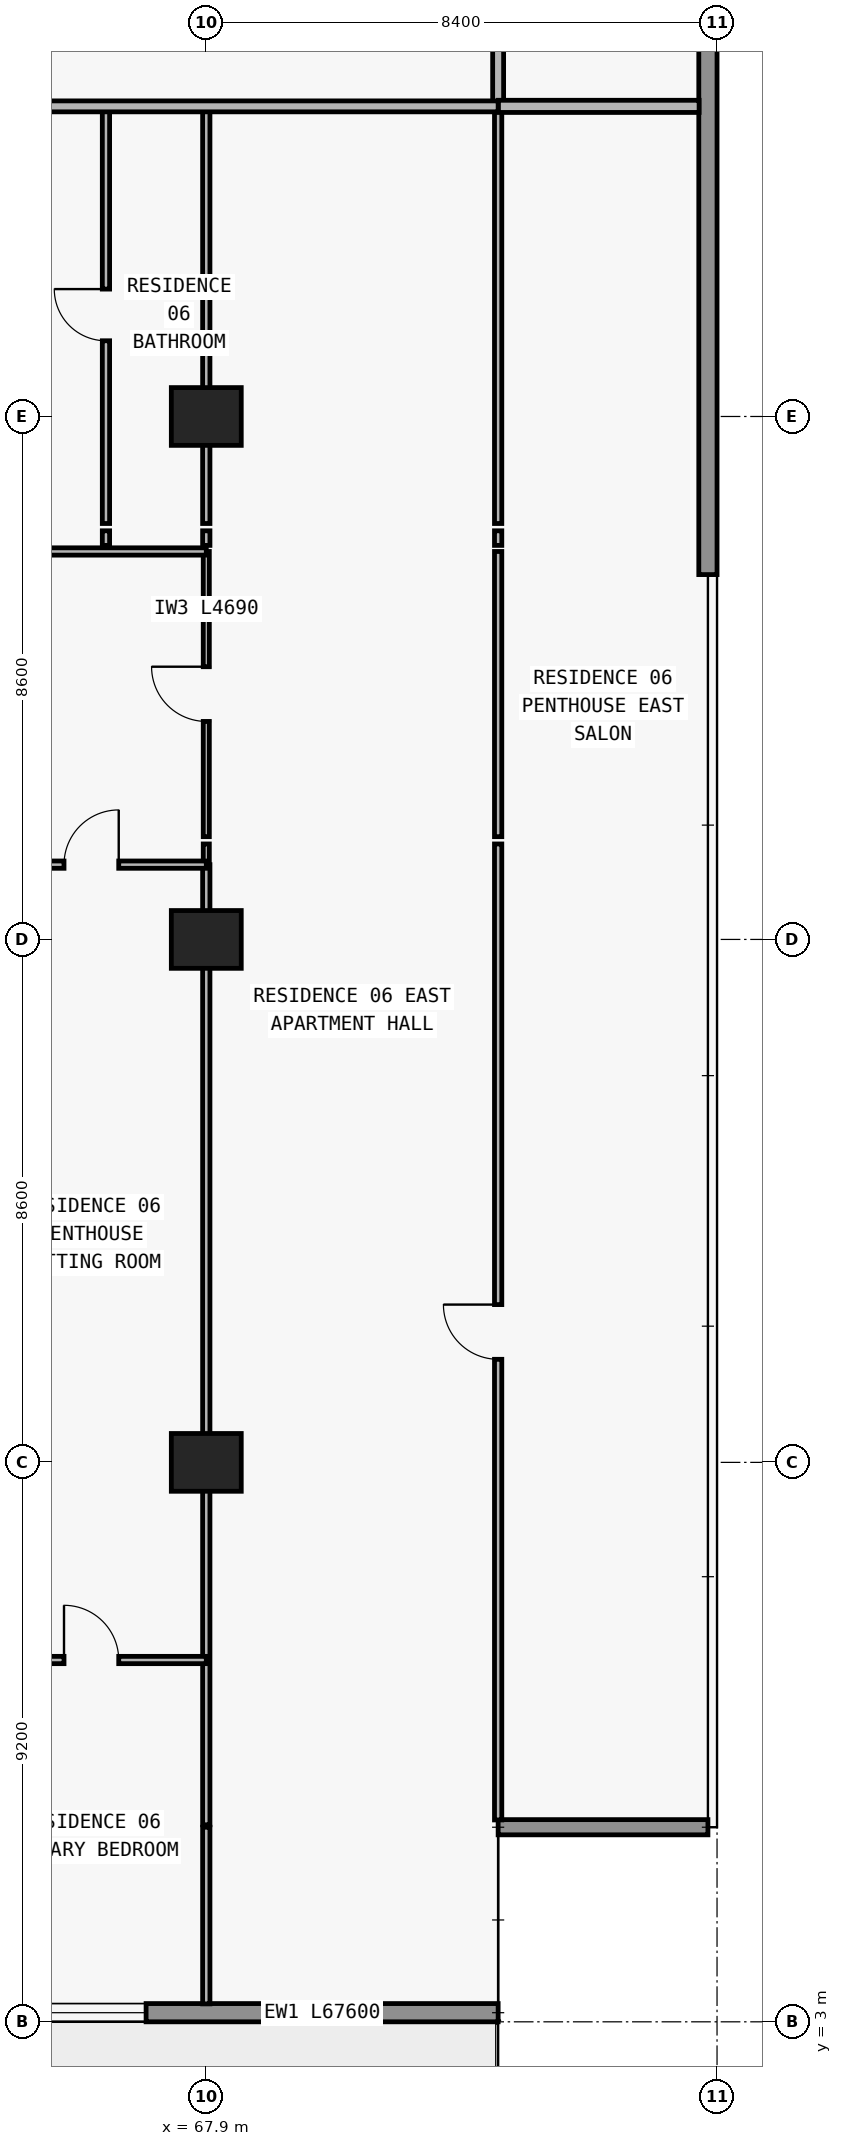
"""IFC4 building model, lengths in metres.
Left out: names, types, materials, properties, quantities, classifications, styles, units other than length and angle.
Written with IfcOpenShell. Run it as: python <this file> out.ifc"""

import sys

from ifc_helpers import new_model, si_unit, direction, frame, frame_2d, origin, origin_2d, place, context, subcontext, project, spatial, rectangle, extrude, element, fill, save


model = new_model("IFC4")
c1 = context("Model", 3, precision=1e-05, world=origin(), true_north=direction((0.0, 1.0)))
c2 = subcontext(c1, "Body", "Model", "MODEL_VIEW")
j1 = project(units=[si_unit("LENGTHUNIT", "METRE"), si_unit("PLANEANGLEUNIT", "RADIAN")], contexts=[c1])
p1 = place(None, origin())
s1 = spatial("IfcSite", under=j1, at=p1, CompositionType="ELEMENT")
p2 = place(p1, origin())
s2 = spatial("IfcBuilding", under=s1, at=p2, CompositionType="ELEMENT")
p3 = place(p2, frame((0.0, 0.0, 36.6)))
s3 = spatial("IfcBuildingStorey", under=s2, at=p3, CompositionType="ELEMENT", Elevation=36.6)
for number, where, z_axis, x_axis in (
    (1, (67.9, 12.2, 0.0), (0.0, 0.0, 1.0), (1.0, 0.0, 0.0)),
    (2, (67.9, 20.8, 0.0), (0.0, 0.0, 1.0), (1.0, 0.0, 0.0)),
    (3, (67.9, 29.4, 0.0), (0.0, 0.0, 1.0), (1.0, 0.0, 0.0)),
):
    element("IfcColumn", number, at=place(p3, frame(where, z_axis=z_axis, x_axis=x_axis)), inside=s3, PredefinedType="COLUMN", context=c2, shape_type="SweptSolid", body=[
        extrude(rectangle(XDim=1.15, YDim=0.95, at=origin_2d()), origin(), (0.0, 0.0, 1.0), 3.05),
    ])
p4 = place(p3, frame((72.7, 3.15, 0.0), z_axis=(0.0, 0.0, 1.0), x_axis=(-1.0, 0.0, 0.0)))
e4 = element("IfcWall", 4, at=p4, inside=s3, PredefinedType="STANDARD", context=c2, shape_type="SweptSolid", body=[
    extrude(rectangle(XDim=67.6, YDim=0.3, at=frame_2d((33.8, 0.0))), origin(), (0.0, 0.0, 1.0), 3.05),
])
p5 = place(p4, frame((59.826, 0.0, 0.0)))
e5 = element("IfcOpeningElement", 5, at=p5, cuts=e4, PredefinedType="OPENING", context=c2, shape_type="SweptSolid", body=[
    extrude(rectangle(XDim=2.0, YDim=2.3, at=frame_2d((1.0, 1.15))), frame((0.0, 0.16, 0.0), z_axis=(0.0, -1.0, 0.0), x_axis=(1.0, 0.0, 0.0)), (0.0, 0.0, 1.0), 0.32),
])
p6 = place(p4, frame((55.526, 0.0, 0.85)))
e6 = element("IfcOpeningElement", 6, at=p6, cuts=e4, PredefinedType="OPENING", context=c2, shape_type="SweptSolid", body=[
    extrude(rectangle(XDim=2.2, YDim=1.55, at=frame_2d((1.1, 0.775))), frame((0.0, 0.16, 0.0), z_axis=(0.0, -1.0, 0.0), x_axis=(1.0, 0.0, 0.0)), (0.0, 0.0, 1.0), 0.32),
])
p7 = place(p4, frame((51.09, 0.0, 0.0)))
e7 = element("IfcOpeningElement", 7, at=p7, cuts=e4, PredefinedType="OPENING", context=c2, shape_type="SweptSolid", body=[
    extrude(rectangle(XDim=2.0, YDim=2.3, at=frame_2d((1.0, 1.15))), frame((0.0, 0.16, 0.0), z_axis=(0.0, -1.0, 0.0), x_axis=(1.0, 0.0, 0.0)), (0.0, 0.0, 1.0), 0.32),
])
p8 = place(p4, frame((46.99, 0.0, 0.85)))
e8 = element("IfcOpeningElement", 8, at=p8, cuts=e4, PredefinedType="OPENING", context=c2, shape_type="SweptSolid", body=[
    extrude(rectangle(XDim=1.8, YDim=1.55, at=frame_2d((0.9, 0.775))), frame((0.0, 0.16, 0.0), z_axis=(0.0, -1.0, 0.0), x_axis=(1.0, 0.0, 0.0)), (0.0, 0.0, 1.0), 0.32),
])
p9 = place(p4, frame((43.026, 0.0, 0.0)))
e9 = element("IfcOpeningElement", 9, at=p9, cuts=e4, PredefinedType="OPENING", context=c2, shape_type="SweptSolid", body=[
    extrude(rectangle(XDim=2.0, YDim=2.3, at=frame_2d((1.0, 1.15))), frame((0.0, 0.16, 0.0), z_axis=(0.0, -1.0, 0.0), x_axis=(1.0, 0.0, 0.0)), (0.0, 0.0, 1.0), 0.32),
])
p10 = place(p4, frame((38.726, 0.0, 0.85)))
e10 = element("IfcOpeningElement", 10, at=p10, cuts=e4, PredefinedType="OPENING", context=c2, shape_type="SweptSolid", body=[
    extrude(rectangle(XDim=2.2, YDim=1.55, at=frame_2d((1.1, 0.775))), frame((0.0, 0.16, 0.0), z_axis=(0.0, -1.0, 0.0), x_axis=(1.0, 0.0, 0.0)), (0.0, 0.0, 1.0), 0.32),
])
p11 = place(p4, frame((34.69, 0.0, 0.0)))
e11 = element("IfcOpeningElement", 11, at=p11, cuts=e4, PredefinedType="OPENING", context=c2, shape_type="SweptSolid", body=[
    extrude(rectangle(XDim=2.0, YDim=2.3, at=frame_2d((1.0, 1.15))), frame((0.0, 0.16, 0.0), z_axis=(0.0, -1.0, 0.0), x_axis=(1.0, 0.0, 0.0)), (0.0, 0.0, 1.0), 0.32),
])
p12 = place(p4, frame((30.81, 0.0, 0.65)))
e12 = element("IfcOpeningElement", 12, at=p12, cuts=e4, PredefinedType="OPENING", context=c2, shape_type="SweptSolid", body=[
    extrude(rectangle(XDim=2.6, YDim=1.85, at=frame_2d((1.3, 0.925))), frame((0.0, 0.16, 0.0), z_axis=(0.0, -1.0, 0.0), x_axis=(1.0, 0.0, 0.0)), (0.0, 0.0, 1.0), 0.32),
])
p13 = place(p4, frame((24.7, 0.0, 0.85)))
e13 = element("IfcOpeningElement", 13, at=p13, cuts=e4, PredefinedType="OPENING", context=c2, shape_type="SweptSolid", body=[
    extrude(rectangle(XDim=2.2, YDim=1.55, at=frame_2d((1.1, 0.775))), frame((0.0, 0.16, 0.0), z_axis=(0.0, -1.0, 0.0), x_axis=(1.0, 0.0, 0.0)), (0.0, 0.0, 1.0), 0.32),
])
p14 = place(p4, frame((18.626, 0.0, 0.0)))
e14 = element("IfcOpeningElement", 14, at=p14, cuts=e4, PredefinedType="OPENING", context=c2, shape_type="SweptSolid", body=[
    extrude(rectangle(XDim=2.0, YDim=2.3, at=frame_2d((1.0, 1.15))), frame((0.0, 0.16, 0.0), z_axis=(0.0, -1.0, 0.0), x_axis=(1.0, 0.0, 0.0)), (0.0, 0.0, 1.0), 0.32),
])
p15 = place(p4, frame((14.326, 0.0, 0.85)))
e15 = element("IfcOpeningElement", 15, at=p15, cuts=e4, PredefinedType="OPENING", context=c2, shape_type="SweptSolid", body=[
    extrude(rectangle(XDim=2.2, YDim=1.55, at=frame_2d((1.1, 0.775))), frame((0.0, 0.16, 0.0), z_axis=(0.0, -1.0, 0.0), x_axis=(1.0, 0.0, 0.0)), (0.0, 0.0, 1.0), 0.32),
])
p16 = place(p4, frame((9.89, 0.0, 0.0)))
e16 = element("IfcOpeningElement", 16, at=p16, cuts=e4, PredefinedType="OPENING", context=c2, shape_type="SweptSolid", body=[
    extrude(rectangle(XDim=2.0, YDim=2.3, at=frame_2d((1.0, 1.15))), frame((0.0, 0.16, 0.0), z_axis=(0.0, -1.0, 0.0), x_axis=(1.0, 0.0, 0.0)), (0.0, 0.0, 1.0), 0.32),
])
p17 = place(p4, frame((5.79, 0.0, 0.85)))
e17 = element("IfcOpeningElement", 17, at=p17, cuts=e4, PredefinedType="OPENING", context=c2, shape_type="SweptSolid", body=[
    extrude(rectangle(XDim=1.8, YDim=1.55, at=frame_2d((0.9, 0.775))), frame((0.0, 0.16, 0.0), z_axis=(0.0, -1.0, 0.0), x_axis=(1.0, 0.0, 0.0)), (0.0, 0.0, 1.0), 0.32),
])
p18 = place(p3, frame((72.7, 6.2, 0.0), z_axis=(0.0, 0.0, 1.0), x_axis=(1.0, 0.0, 0.0)))
e18 = element("IfcWall", 18, at=p18, inside=s3, PredefinedType="ELEMENTEDWALL", context=c2, shape_type="SweptSolid", body=[
    extrude(rectangle(XDim=3.45, YDim=0.25, at=frame_2d((1.725, 0.0))), origin(), (0.0, 0.0, 1.0), 3.05),
])
p19 = place(p3, frame((76.15, 47.4, 0.0), z_axis=(0.0, 0.0, 1.0), x_axis=(0.0, -1.0, 0.0)))
e19 = element("IfcWall", 19, at=p19, inside=s3, PredefinedType="STANDARD", context=c2, shape_type="SweptSolid", body=[
    extrude(rectangle(XDim=20.6, YDim=0.3, at=frame_2d((10.3, 0.0))), origin(), (0.0, 0.0, 1.0), 3.05),
])
p20 = place(p3, frame((66.25, 27.28, 0.0), z_axis=(0.0, 0.0, 1.0), x_axis=(0.0, 1.0, 0.0)))
e20 = element("IfcWall", 20, at=p20, inside=s3, PredefinedType="PARTITIONING", context=c2, shape_type="SweptSolid", body=[
    extrude(rectangle(XDim=0.24, YDim=0.12, at=frame_2d((0.12, 0.0))), origin(), (0.0, 0.0, 1.0), 3.05),
])
p21 = place(p3, frame((66.25, 27.64, 0.0), z_axis=(0.0, 0.0, 1.0), x_axis=(0.0, 1.0, 0.0)))
e21 = element("IfcWall", 21, at=p21, inside=s3, PredefinedType="PARTITIONING", context=c2, shape_type="SweptSolid", body=[
    extrude(rectangle(XDim=6.86, YDim=0.12, at=frame_2d((3.43, 0.0))), origin(), (0.0, 0.0, 1.0), 3.05),
])
p22 = place(p21, frame((3.005, 0.0, 0.0)))
e22 = element("IfcOpeningElement", 22, at=p22, cuts=e21, PredefinedType="OPENING", context=c2, shape_type="SweptSolid", body=[
    extrude(rectangle(XDim=0.85, YDim=2.1, at=frame_2d((0.425, 1.05))), frame((0.0, 0.07, 0.0), z_axis=(0.0, -1.0, 0.0), x_axis=(1.0, 0.0, 0.0)), (0.0, 0.0, 1.0), 0.14),
])
p23 = place(p3, frame((67.9, 3.295, 0.0), z_axis=(0.0, 0.0, 1.0), x_axis=(0.0, 1.0, 0.0)))
e23 = element("IfcWall", 23, at=p23, inside=s3, PredefinedType="PARTITIONING", context=c2, shape_type="SweptSolid", body=[
    extrude(rectangle(XDim=2.905, YDim=0.12, at=frame_2d((1.453, 0.0))), origin(), (0.0, 0.0, 1.0), 3.05),
])
p24 = place(p3, frame((67.9, 6.24, 0.0), z_axis=(0.0, 0.0, 1.0), x_axis=(0.0, 1.0, 0.0)))
e24 = element("IfcWall", 24, at=p24, inside=s3, PredefinedType="PARTITIONING", context=c2, shape_type="SweptSolid", body=[
    extrude(rectangle(XDim=15.79, YDim=0.12, at=frame_2d((7.895, 0.0))), origin(), (0.0, 0.0, 1.0), 2.11),
])
p25 = place(p3, frame((67.9, 22.035, 0.0), z_axis=(0.0, 0.0, 1.0), x_axis=(0.0, 1.0, 0.0)))
e25 = element("IfcWall", 25, at=p25, inside=s3, PredefinedType="MOVABLE", context=c2, shape_type="SweptSolid", body=[
    extrude(rectangle(XDim=0.335, YDim=0.1, at=frame_2d((0.167, 0.0))), origin(), (0.0, 0.0, 1.0), 2.11),
])
p26 = place(p3, frame((67.9, 22.49, 0.0), z_axis=(0.0, 0.0, 1.0), x_axis=(0.0, 1.0, 0.0)))
e26 = element("IfcWall", 26, at=p26, inside=s3, PredefinedType="MOVABLE", context=c2, shape_type="SweptSolid", body=[
    extrude(rectangle(XDim=4.69, YDim=0.1, at=frame_2d((2.345, 0.0))), origin(), (0.0, 0.0, 1.0), 2.11),
])
p27 = place(p26, frame((1.895, 0.0, 0.0)))
e27 = element("IfcOpeningElement", 27, at=p27, cuts=e26, PredefinedType="OPENING", context=c2, shape_type="SweptSolid", body=[
    extrude(rectangle(XDim=0.9, YDim=2.06, at=frame_2d((0.45, 1.03))), frame((0.0, 0.06, 0.0), z_axis=(0.0, -1.0, 0.0), x_axis=(1.0, 0.0, 0.0)), (0.0, 0.0, 1.0), 0.12),
])
p28 = place(p3, frame((67.9, 27.28, 0.0), z_axis=(0.0, 0.0, 1.0), x_axis=(0.0, 1.0, 0.0)))
e28 = element("IfcWall", 28, at=p28, inside=s3, PredefinedType="PARTITIONING", context=c2, shape_type="SweptSolid", body=[
    extrude(rectangle(XDim=0.24, YDim=0.12, at=frame_2d((0.12, 0.0))), origin(), (0.0, 0.0, 1.0), 2.11),
])
p29 = place(p3, frame((67.9, 27.64, 0.0), z_axis=(0.0, 0.0, 1.0), x_axis=(0.0, 1.0, 0.0)))
e29 = element("IfcWall", 29, at=p29, inside=s3, PredefinedType="PARTITIONING", context=c2, shape_type="SweptSolid", body=[
    extrude(rectangle(XDim=6.86, YDim=0.12, at=frame_2d((3.43, 0.0))), origin(), (0.0, 0.0, 1.0), 2.11),
])
p30 = place(p3, frame((72.7, 6.32, 0.0), z_axis=(0.0, 0.0, 1.0), x_axis=(0.0, 1.0, 0.0)))
e30 = element("IfcWall", 30, at=p30, inside=s3, PredefinedType="PARTITIONING", context=c2, shape_type="SweptSolid", body=[
    extrude(rectangle(XDim=16.05, YDim=0.12, at=frame_2d((8.025, 0.0))), origin(), (0.0, 0.0, 1.0), 3.05),
])
p31 = place(p30, frame((7.575, 0.0, 0.0)))
e31 = element("IfcOpeningElement", 31, at=p31, cuts=e30, PredefinedType="OPENING", context=c2, shape_type="SweptSolid", body=[
    extrude(rectangle(XDim=0.9, YDim=2.15, at=frame_2d((0.45, 1.075))), frame((0.0, 0.07, 0.0), z_axis=(0.0, -1.0, 0.0), x_axis=(1.0, 0.0, 0.0)), (0.0, 0.0, 1.0), 0.14),
])
p32 = place(p3, frame((72.7, 22.49, 0.0), z_axis=(0.0, 0.0, 1.0), x_axis=(0.0, 1.0, 0.0)))
e32 = element("IfcWall", 32, at=p32, inside=s3, PredefinedType="PARTITIONING", context=c2, shape_type="SweptSolid", body=[
    extrude(rectangle(XDim=4.69, YDim=0.12, at=frame_2d((2.345, 0.0))), origin(), (0.0, 0.0, 1.0), 3.05),
])
p33 = place(p3, frame((72.7, 27.28, 0.0), z_axis=(0.0, 0.0, 1.0), x_axis=(0.0, 1.0, 0.0)))
e33 = element("IfcWall", 33, at=p33, inside=s3, PredefinedType="PARTITIONING", context=c2, shape_type="SweptSolid", body=[
    extrude(rectangle(XDim=0.24, YDim=0.12, at=frame_2d((0.12, 0.0))), origin(), (0.0, 0.0, 1.0), 3.05),
])
p34 = place(p3, frame((72.7, 27.64, 0.0), z_axis=(0.0, 0.0, 1.0), x_axis=(0.0, 1.0, 0.0)))
e34 = element("IfcWall", 34, at=p34, inside=s3, PredefinedType="PARTITIONING", context=c2, shape_type="SweptSolid", body=[
    extrude(rectangle(XDim=6.86, YDim=0.12, at=frame_2d((3.43, 0.0))), origin(), (0.0, 0.0, 1.0), 3.05),
])
p35 = place(p3, frame((72.7, 34.505, 0.0), z_axis=(0.0, 0.0, 1.0), x_axis=(0.0, 1.0, 0.0)))
e35 = element("IfcWall", 35, at=p35, inside=s3, PredefinedType="PARTITIONING", context=c2, shape_type="SweptSolid", body=[
    extrude(rectangle(XDim=2.395, YDim=0.18, at=frame_2d((1.198, 0.0))), origin(), (0.0, 0.0, 1.0), 3.05),
])
p36 = place(p3, frame((64.12, 8.95, 0.0), z_axis=(0.0, 0.0, 1.0), x_axis=(1.0, 0.0, 0.0)))
e36 = element("IfcWall", 36, at=p36, inside=s3, PredefinedType="PARTITIONING", context=c2, shape_type="SweptSolid", body=[
    extrude(rectangle(XDim=3.78, YDim=0.12, at=frame_2d((1.89, 0.0))), origin(), (0.0, 0.0, 1.0), 3.05),
])
p37 = place(p36, frame((1.44, 0.0, 0.0)))
e37 = element("IfcOpeningElement", 37, at=p37, cuts=e36, PredefinedType="OPENING", context=c2, shape_type="SweptSolid", body=[
    extrude(rectangle(XDim=0.9, YDim=2.15, at=frame_2d((0.45, 1.075))), frame((0.0, 0.07, 0.0), z_axis=(0.0, -1.0, 0.0), x_axis=(1.0, 0.0, 0.0)), (0.0, 0.0, 1.0), 0.14),
])
p38 = place(p3, frame((59.5, 22.03, 0.0), z_axis=(0.0, 0.0, 1.0), x_axis=(1.0, 0.0, 0.0)))
e38 = element("IfcWall", 38, at=p38, inside=s3, PredefinedType="PARTITIONING", context=c2, shape_type="SweptSolid", body=[
    extrude(rectangle(XDim=8.4, YDim=0.12, at=frame_2d((4.2, 0.0))), origin(), (0.0, 0.0, 1.0), 3.05),
])
p39 = place(p38, frame((1.693, 0.0, 0.0)))
e39 = element("IfcOpeningElement", 39, at=p39, cuts=e38, PredefinedType="OPENING", context=c2, shape_type="SweptSolid", body=[
    extrude(rectangle(XDim=0.9, YDim=2.15, at=frame_2d((0.45, 1.075))), frame((0.0, 0.07, 0.0), z_axis=(0.0, -1.0, 0.0), x_axis=(1.0, 0.0, 0.0)), (0.0, 0.0, 1.0), 0.14),
])
p40 = place(p38, frame((6.06, 0.0, 0.0)))
e40 = element("IfcOpeningElement", 40, at=p40, cuts=e38, PredefinedType="OPENING", context=c2, shape_type="SweptSolid", body=[
    extrude(rectangle(XDim=0.9, YDim=2.15, at=frame_2d((0.45, 1.075))), frame((0.0, 0.07, 0.0), z_axis=(0.0, -1.0, 0.0), x_axis=(1.0, 0.0, 0.0)), (0.0, 0.0, 1.0), 0.14),
])
p41 = place(p3, frame((59.5, 27.18, 0.0), z_axis=(0.0, 0.0, 1.0), x_axis=(1.0, 0.0, 0.0)))
e41 = element("IfcWall", 41, at=p41, inside=s3, PredefinedType="PARTITIONING", context=c2, shape_type="SweptSolid", body=[
    extrude(rectangle(XDim=8.4, YDim=0.12, at=frame_2d((4.2, 0.0))), origin(), (0.0, 0.0, 1.0), 3.05),
])
p42 = place(p41, frame((1.693, 0.0, 0.0)))
e42 = element("IfcOpeningElement", 42, at=p42, cuts=e41, PredefinedType="OPENING", context=c2, shape_type="SweptSolid", body=[
    extrude(rectangle(XDim=0.9, YDim=2.15, at=frame_2d((0.45, 1.075))), frame((0.0, 0.07, 0.0), z_axis=(0.0, -1.0, 0.0), x_axis=(1.0, 0.0, 0.0)), (0.0, 0.0, 1.0), 0.14),
])
p43 = place(p3, frame((55.9, 34.5, 0.0), z_axis=(0.0, 0.0, 1.0), x_axis=(1.0, 0.0, 0.0)))
e43 = element("IfcWall", 43, at=p43, inside=s3, PredefinedType="PARTITIONING", context=c2, shape_type="SweptSolid", body=[
    extrude(rectangle(XDim=16.8, YDim=0.18, at=frame_2d((8.4, 0.0))), origin(), (0.0, 0.0, 1.0), 3.05),
])
p44 = place(p43, frame((6.475, 0.0, 0.0)))
e44 = element("IfcOpeningElement", 44, at=p44, cuts=e43, PredefinedType="OPENING", context=c2, shape_type="SweptSolid", body=[
    extrude(rectangle(XDim=1.0, YDim=2.2, at=frame_2d((0.5, 1.1))), frame((0.0, 0.1, 0.0), z_axis=(0.0, -1.0, 0.0), x_axis=(1.0, 0.0, 0.0)), (0.0, 0.0, 1.0), 0.2),
])
p45 = place(p3, frame((72.705, 34.5, 0.0), z_axis=(0.0, 0.0, 1.0), x_axis=(1.0, 0.0, 0.0)))
e45 = element("IfcWall", 45, at=p45, inside=s3, PredefinedType="PARTITIONING", context=c2, shape_type="SweptSolid", body=[
    extrude(rectangle(XDim=3.3, YDim=0.2, at=frame_2d((1.65, 0.0))), origin(), (0.0, 0.0, 1.0), 3.05),
])
p46 = place(p17, origin())
e46 = element("IfcWindow", 46, at=p46, inside=s3, PartitioningType="SINGLE_PANEL", PredefinedType="WINDOW", context=c2, shape_type="SweptSolid", body=[
    extrude(rectangle(XDim=1.8, YDim=1.55, at=frame_2d((0.9, 0.775))), frame((0.0, 0.03, 0.0), z_axis=(0.0, -1.0, 0.0), x_axis=(1.0, 0.0, 0.0)), (0.0, 0.0, 1.0), 0.06),
])
fill(e17, e46)
p47 = place(p22, origin())
e47 = element("IfcDoor", 47, at=p47, inside=s3, OperationType="SINGLE_SWING_RIGHT", PredefinedType="DOOR", context=c2, shape_type="SweptSolid", body=[
    extrude(rectangle(XDim=0.85, YDim=2.1, at=frame_2d((0.425, 1.05))), frame((0.0, 0.025, 0.0), z_axis=(0.0, -1.0, 0.0), x_axis=(1.0, 0.0, 0.0)), (0.0, 0.0, 1.0), 0.05),
])
fill(e22, e47)
p48 = place(p40, origin())
e48 = element("IfcDoor", 48, at=p48, inside=s3, OperationType="SINGLE_SWING_RIGHT", PredefinedType="DOOR", context=c2, shape_type="SweptSolid", body=[
    extrude(rectangle(XDim=0.9, YDim=2.15, at=frame_2d((0.45, 1.075))), frame((0.0, 0.025, 0.0), z_axis=(0.0, -1.0, 0.0), x_axis=(1.0, 0.0, 0.0)), (0.0, 0.0, 1.0), 0.05),
])
fill(e40, e48)
p49 = place(p37, origin())
e49 = element("IfcDoor", 49, at=p49, inside=s3, OperationType="SINGLE_SWING_LEFT", PredefinedType="DOOR", context=c2, shape_type="SweptSolid", body=[
    extrude(rectangle(XDim=0.9, YDim=2.15, at=frame_2d((0.45, 1.075))), frame((0.0, 0.025, 0.0), z_axis=(0.0, -1.0, 0.0), x_axis=(1.0, 0.0, 0.0)), (0.0, 0.0, 1.0), 0.05),
])
fill(e37, e49)
p50 = place(p27, origin())
e50 = element("IfcDoor", 50, at=p50, inside=s3, OperationType="SINGLE_SWING_RIGHT", PredefinedType="DOOR", context=c2, shape_type="SweptSolid", body=[
    extrude(rectangle(XDim=0.9, YDim=2.06, at=frame_2d((0.45, 1.03))), frame((0.0, 0.025, 0.0), z_axis=(0.0, -1.0, 0.0), x_axis=(1.0, 0.0, 0.0)), (0.0, 0.0, 1.0), 0.05),
])
fill(e27, e50)
p51 = place(p31, origin())
e51 = element("IfcDoor", 51, at=p51, inside=s3, OperationType="SINGLE_SWING_RIGHT", PredefinedType="DOOR", context=c2, shape_type="SweptSolid", body=[
    extrude(rectangle(XDim=0.9, YDim=2.15, at=frame_2d((0.45, 1.075))), frame((0.0, 0.025, 0.0), z_axis=(0.0, -1.0, 0.0), x_axis=(1.0, 0.0, 0.0)), (0.0, 0.0, 1.0), 0.05),
])
fill(e31, e51)
save(model, sys.argv[1])
